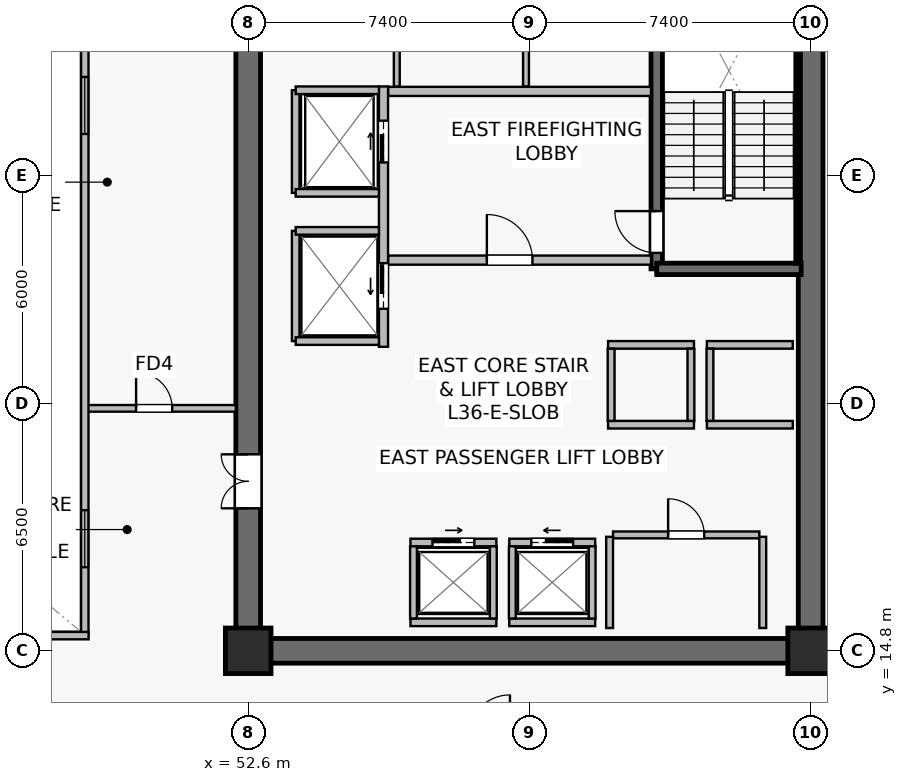
"""IFC4 building model, lengths in metres.
Left out: names, types, materials, properties, quantities, classifications, styles, units other than length and angle.
Written with IfcOpenShell. Run it as: python <this file> out.ifc"""

import sys

from ifc_helpers import new_model, si_unit, direction, frame, frame_2d, origin, origin_2d, place, context, subcontext, project, spatial, rectangle, extrude, source, transform, mapped, element, fill, save


model = new_model("IFC4")
c1 = context("Model", 3, precision=1e-05, world=origin(), true_north=direction((0.0, 1.0)))
c2 = subcontext(c1, "Body", "Model", "MODEL_VIEW")
j1 = project(units=[si_unit("LENGTHUNIT", "METRE"), si_unit("PLANEANGLEUNIT", "RADIAN")], contexts=[c1])
p1 = place(None, origin())
s1 = spatial("IfcSite", under=j1, at=p1, CompositionType="ELEMENT")
p2 = place(p1, origin())
s2 = spatial("IfcBuilding", under=s1, at=p2, CompositionType="ELEMENT")
p3 = place(p2, frame((0.0, 0.0, 150.2)))
s3 = spatial("IfcBuildingStorey", under=s2, at=p3, CompositionType="ELEMENT", Elevation=150.2)
p4 = place(p3, frame((52.275, 14.8, 0.0), z_axis=(0.0, 0.0, 1.0), x_axis=(1.0, 0.0, 0.0)))
e1 = element("IfcWall", 1, at=p4, inside=s3, PredefinedType="SHEAR", context=c2, shape_type="SweptSolid", body=[
    extrude(rectangle(XDim=15.45, YDim=0.65, at=frame_2d((7.725, 0.0))), origin(), (0.0, 0.0, 1.0), 3.79),
])
p5 = place(p3, frame((52.6, 15.125, 0.0), z_axis=(0.0, 0.0, 1.0), x_axis=(0.0, 1.0, 0.0)))
e2 = element("IfcWall", 2, at=p5, inside=s3, PredefinedType="SHEAR", context=c2, shape_type="SweptSolid", body=[
    extrude(rectangle(XDim=18.35, YDim=0.65, at=frame_2d((9.175, 0.0))), origin(), (0.0, 0.0, 1.0), 3.79),
])
p6 = place(p5, frame((3.425, 0.0, 0.0)))
e3 = element("IfcOpeningElement", 3, at=p6, cuts=e2, PredefinedType="OPENING", context=c2, shape_type="SweptSolid", body=[
    extrude(rectangle(XDim=1.42, YDim=2.2, at=frame_2d((0.71, 1.1))), frame((0.0, 0.335, 0.0), z_axis=(0.0, -1.0, 0.0), x_axis=(1.0, 0.0, 0.0)), (0.0, 0.0, 1.0), 0.67),
])
p7 = place(p3, frame((67.4, 15.125, 0.0), z_axis=(0.0, 0.0, 1.0), x_axis=(0.0, 1.0, 0.0)))
e4 = element("IfcWall", 4, at=p7, inside=s3, PredefinedType="SHEAR", context=c2, shape_type="SweptSolid", body=[
    extrude(rectangle(XDim=18.35, YDim=0.65, at=frame_2d((9.175, 0.0))), origin(), (0.0, 0.0, 1.0), 3.79),
])
p8 = place(p3, frame((63.35, 24.85, 0.0), z_axis=(0.0, 0.0, 1.0), x_axis=(0.0, 1.0, 0.0)))
e5 = element("IfcWall", 5, at=p8, inside=s3, PredefinedType="SHEAR", context=c2, shape_type="SweptSolid", body=[
    extrude(rectangle(XDim=8.63, YDim=0.3, at=frame_2d((4.315, 0.0))), origin(), (0.0, 0.0, 1.0), 3.79),
])
p9 = place(p8, frame((0.42, 0.0, 0.0)))
e6 = element("IfcOpeningElement", 6, at=p9, cuts=e5, PredefinedType="OPENING", context=c2, shape_type="SweptSolid", body=[
    extrude(rectangle(XDim=1.1, YDim=2.15, at=frame_2d((0.55, 1.075))), frame((0.0, 0.16, 0.0), z_axis=(0.0, -1.0, 0.0), x_axis=(1.0, 0.0, 0.0)), (0.0, 0.0, 1.0), 0.32),
])
p10 = place(p3, frame((63.35, 24.85, 0.0), z_axis=(0.0, 0.0, 1.0), x_axis=(1.0, 0.0, 0.0)))
e7 = element("IfcWall", 7, at=p10, inside=s3, PredefinedType="SHEAR", context=c2, shape_type="SweptSolid", body=[
    extrude(rectangle(XDim=3.8, YDim=0.3, at=frame_2d((1.9, 0.0))), origin(), (0.0, 0.0, 1.0), 3.79),
])
p11 = place(p3, frame((67.07, 25.0, 0.0), z_axis=(0.0, 0.0, 1.0), x_axis=(0.0, 1.0, 0.0)))
e8 = element("IfcWall", 8, at=p11, inside=s3, PredefinedType="SOLIDWALL", context=c2, shape_type="SweptSolid", body=[
    extrude(rectangle(XDim=8.32, YDim=0.12, at=frame_2d((4.16, 0.0))), origin(), (0.0, 0.0, 1.0), 3.79),
])
m1 = source(origin(), c2, "Body", "SweptSolid", [
    extrude(rectangle(XDim=1.2, YDim=1.2, at=origin_2d()), origin(), (0.0, 0.0, 1.0), 4.1),
])
for number, where, z_axis, x_axis in (
    (9, (52.6, 14.8, 0.0), (0.0, 0.0, 1.0), (1.0, 0.0, 0.0)),
    (10, (67.4, 14.8, 0.0), (0.0, 0.0, 1.0), (1.0, 0.0, 0.0)),
):
    element("IfcColumn", number, at=place(p3, frame(where, z_axis=z_axis, x_axis=x_axis)), inside=s3, PredefinedType="COLUMN", context=c2, shape_type="MappedRepresentation", body=[
        mapped(m1, transform((0.0, 0.0, 0.0), scale=1.0)),
    ])
p12 = place(p3, frame((56.28, 25.08, 0.0), z_axis=(0.0, 0.0, 1.0), x_axis=(1.0, 0.0, 0.0)))
e11 = element("IfcWall", 11, at=p12, inside=s3, PredefinedType="SOLIDWALL", context=c2, shape_type="SweptSolid", body=[
    extrude(rectangle(XDim=6.92, YDim=0.24, at=frame_2d((3.46, 0.0))), origin(), (0.0, 0.0, 1.0), 3.187),
])
p13 = place(p12, frame((2.6, 0.0, 0.0)))
e12 = element("IfcOpeningElement", 12, at=p13, cuts=e11, PredefinedType="OPENING", context=c2, shape_type="SweptSolid", body=[
    extrude(rectangle(XDim=1.2, YDim=2.16, at=frame_2d((0.6, 1.08))), frame((0.0, 0.13, 0.0), z_axis=(0.0, -1.0, 0.0), x_axis=(1.0, 0.0, 0.0)), (0.0, 0.0, 1.0), 0.26),
])
p14 = place(p3, frame((56.28, 29.52, 0.0), z_axis=(0.0, 0.0, 1.0), x_axis=(1.0, 0.0, 0.0)))
e13 = element("IfcWall", 13, at=p14, inside=s3, PredefinedType="SOLIDWALL", context=c2, shape_type="SweptSolid", body=[
    extrude(rectangle(XDim=6.92, YDim=0.24, at=frame_2d((3.46, 0.0))), origin(), (0.0, 0.0, 1.0), 3.187),
])
p15 = place(p3, frame((56.16, 22.8, 0.0), z_axis=(0.0, 0.0, 1.0), x_axis=(0.0, 1.0, 0.0)))
e14 = element("IfcWall", 14, at=p15, inside=s3, PredefinedType="SOLIDWALL", context=c2, shape_type="SweptSolid", body=[
    extrude(rectangle(XDim=6.85, YDim=0.24, at=frame_2d((3.425, 0.0))), origin(), (0.0, 0.0, 1.0), 2.875),
])
p16 = place(p15, frame((4.85, 0.0, 0.0)))
e15 = element("IfcOpeningElement", 15, at=p16, cuts=e14, PredefinedType="OPENING", context=c2, shape_type="SweptSolid", body=[
    extrude(rectangle(XDim=1.1, YDim=2.22, at=frame_2d((0.55, 1.11))), frame((0.0, 0.13, 0.0), z_axis=(0.0, -1.0, 0.0), x_axis=(1.0, 0.0, 0.0)), (0.0, 0.0, 1.0), 0.26),
])
p17 = place(p15, frame((1.0, 0.0, 0.0)))
e16 = element("IfcOpeningElement", 16, at=p17, cuts=e14, PredefinedType="OPENING", context=c2, shape_type="SweptSolid", body=[
    extrude(rectangle(XDim=1.2, YDim=2.22, at=frame_2d((0.6, 1.11))), frame((0.0, 0.13, 0.0), z_axis=(0.0, -1.0, 0.0), x_axis=(1.0, 0.0, 0.0)), (0.0, 0.0, 1.0), 0.26),
])
p18 = place(p3, frame((59.47, 17.65, 0.0), z_axis=(0.0, 0.0, 1.0), x_axis=(1.0, 0.0, 0.0)))
e17 = element("IfcWall", 17, at=p18, inside=s3, PredefinedType="SOLIDWALL", context=c2, shape_type="SweptSolid", body=[
    extrude(rectangle(XDim=2.26, YDim=0.2, at=frame_2d((1.13, 0.0))), origin(), (0.0, 0.0, 1.0), 3.187),
])
p19 = place(p18, frame((0.58, 0.0, 0.0)))
e18 = element("IfcOpeningElement", 18, at=p19, cuts=e17, PredefinedType="OPENING", context=c2, shape_type="SweptSolid", body=[
    extrude(rectangle(XDim=1.1, YDim=2.22, at=frame_2d((0.55, 1.11))), frame((0.0, 0.11, 0.0), z_axis=(0.0, -1.0, 0.0), x_axis=(1.0, 0.0, 0.0)), (0.0, 0.0, 1.0), 0.22),
])
p20 = place(p3, frame((59.47, 15.55, 0.0), z_axis=(0.0, 0.0, 1.0), x_axis=(1.0, 0.0, 0.0)))
e19 = element("IfcWall", 19, at=p20, inside=s3, PredefinedType="SOLIDWALL", context=c2, shape_type="SweptSolid", body=[
    extrude(rectangle(XDim=2.26, YDim=0.2, at=frame_2d((1.13, 0.0))), origin(), (0.0, 0.0, 1.0), 3.187),
])
for number, where, z_axis, x_axis in (
    (20, (59.55, 15.65, 0.0), (0.0, 0.0, 1.0), (0.0, 1.0, 0.0)),
    (21, (61.65, 15.65, 0.0), (0.0, 0.0, 1.0), (0.0, 1.0, 0.0)),
):
    element("IfcWall", number, at=place(p3, frame(where, z_axis=z_axis, x_axis=x_axis)), inside=s3, PredefinedType="SOLIDWALL", context=c2, shape_type="SweptSolid", body=[
        extrude(rectangle(XDim=1.9, YDim=0.18, at=frame_2d((0.95, 0.0))), origin(), (0.0, 0.0, 1.0), 3.79),
    ])
p21 = place(p3, frame((56.87, 17.65, 0.0), z_axis=(0.0, 0.0, 1.0), x_axis=(1.0, 0.0, 0.0)))
e22 = element("IfcWall", 22, at=p21, inside=s3, PredefinedType="SOLIDWALL", context=c2, shape_type="SweptSolid", body=[
    extrude(rectangle(XDim=2.26, YDim=0.2, at=frame_2d((1.13, 0.0))), origin(), (0.0, 0.0, 1.0), 3.79),
])
p22 = place(p21, frame((0.58, 0.0, 0.0)))
e23 = element("IfcOpeningElement", 23, at=p22, cuts=e22, PredefinedType="OPENING", context=c2, shape_type="SweptSolid", body=[
    extrude(rectangle(XDim=1.1, YDim=2.22, at=frame_2d((0.55, 1.11))), frame((0.0, 0.11, 0.0), z_axis=(0.0, -1.0, 0.0), x_axis=(1.0, 0.0, 0.0)), (0.0, 0.0, 1.0), 0.22),
])
p23 = place(p3, frame((56.87, 15.55, 0.0), z_axis=(0.0, 0.0, 1.0), x_axis=(1.0, 0.0, 0.0)))
e24 = element("IfcWall", 24, at=p23, inside=s3, PredefinedType="SOLIDWALL", context=c2, shape_type="SweptSolid", body=[
    extrude(rectangle(XDim=2.26, YDim=0.2, at=frame_2d((1.13, 0.0))), origin(), (0.0, 0.0, 1.0), 3.79),
])
for number, where, z_axis, x_axis in (
    (25, (56.95, 15.65, 0.0), (0.0, 0.0, 1.0), (0.0, 1.0, 0.0)),
    (26, (59.05, 15.65, 0.0), (0.0, 0.0, 1.0), (0.0, 1.0, 0.0)),
):
    element("IfcWall", number, at=place(p3, frame(where, z_axis=z_axis, x_axis=x_axis)), inside=s3, PredefinedType="SOLIDWALL", context=c2, shape_type="SweptSolid", body=[
        extrude(rectangle(XDim=1.9, YDim=0.18, at=frame_2d((0.95, 0.0))), origin(), (0.0, 0.0, 1.0), 3.79),
    ])
for number, where, z_axis, x_axis in (
    (27, (64.67, 20.75, 0.0), (0.0, 0.0, 1.0), (1.0, 0.0, 0.0)),
    (28, (64.67, 22.85, 0.0), (0.0, 0.0, 1.0), (1.0, 0.0, 0.0)),
):
    element("IfcWall", number, at=place(p3, frame(where, z_axis=z_axis, x_axis=x_axis)), inside=s3, PredefinedType="SOLIDWALL", context=c2, shape_type="SweptSolid", body=[
        extrude(rectangle(XDim=2.26, YDim=0.2, at=frame_2d((1.13, 0.0))), origin(), (0.0, 0.0, 1.0), 3.79),
    ])
p24 = place(p3, frame((64.75, 20.85, 0.0), z_axis=(0.0, 0.0, 1.0), x_axis=(0.0, 1.0, 0.0)))
e29 = element("IfcWall", 29, at=p24, inside=s3, PredefinedType="SOLIDWALL", context=c2, shape_type="SweptSolid", body=[
    extrude(rectangle(XDim=1.9, YDim=0.18, at=frame_2d((0.95, 0.0))), origin(), (0.0, 0.0, 1.0), 3.79),
])
for number, where, z_axis, x_axis in (
    (30, (62.07, 20.75, 0.0), (0.0, 0.0, 1.0), (1.0, 0.0, 0.0)),
    (31, (62.07, 22.85, 0.0), (0.0, 0.0, 1.0), (1.0, 0.0, 0.0)),
):
    element("IfcWall", number, at=place(p3, frame(where, z_axis=z_axis, x_axis=x_axis)), inside=s3, PredefinedType="SOLIDWALL", context=c2, shape_type="SweptSolid", body=[
        extrude(rectangle(XDim=2.26, YDim=0.2, at=frame_2d((1.13, 0.0))), origin(), (0.0, 0.0, 1.0), 3.79),
    ])
for number, where, z_axis, x_axis in (
    (32, (62.15, 20.85, 0.0), (0.0, 0.0, 1.0), (0.0, 1.0, 0.0)),
    (33, (64.25, 20.85, 0.0), (0.0, 0.0, 1.0), (0.0, 1.0, 0.0)),
):
    element("IfcWall", number, at=place(p3, frame(where, z_axis=z_axis, x_axis=x_axis)), inside=s3, PredefinedType="SOLIDWALL", context=c2, shape_type="SweptSolid", body=[
        extrude(rectangle(XDim=1.9, YDim=0.18, at=frame_2d((0.95, 0.0))), origin(), (0.0, 0.0, 1.0), 3.79),
    ])
p25 = place(p3, frame((53.85, 26.85, 0.0), z_axis=(0.0, 0.0, 1.0), x_axis=(0.0, 1.0, 0.0)))
e34 = element("IfcWall", 34, at=p25, inside=s3, PredefinedType="SOLIDWALL", context=c2, shape_type="SweptSolid", body=[
    extrude(rectangle(XDim=2.7, YDim=0.2, at=frame_2d((1.35, 0.0))), origin(), (0.0, 0.0, 1.0), 3.79),
])
p26 = place(p3, frame((53.85, 29.55, 0.0), z_axis=(0.0, 0.0, 1.0), x_axis=(1.0, 0.0, 0.0)))
e35 = element("IfcWall", 35, at=p26, inside=s3, PredefinedType="SOLIDWALL", context=c2, shape_type="SweptSolid", body=[
    extrude(rectangle(XDim=2.19, YDim=0.2, at=frame_2d((1.095, 0.0))), origin(), (0.0, 0.0, 1.0), 3.79),
])
p27 = place(p3, frame((53.85, 26.85, 0.0), z_axis=(0.0, 0.0, 1.0), x_axis=(1.0, 0.0, 0.0)))
e36 = element("IfcWall", 36, at=p27, inside=s3, PredefinedType="SOLIDWALL", context=c2, shape_type="SweptSolid", body=[
    extrude(rectangle(XDim=2.19, YDim=0.2, at=frame_2d((1.095, 0.0))), origin(), (0.0, 0.0, 1.0), 3.187),
])
p28 = place(p3, frame((53.85, 22.95, 0.0), z_axis=(0.0, 0.0, 1.0), x_axis=(0.0, 1.0, 0.0)))
e37 = element("IfcWall", 37, at=p28, inside=s3, PredefinedType="SOLIDWALL", context=c2, shape_type="SweptSolid", body=[
    extrude(rectangle(XDim=2.9, YDim=0.2, at=frame_2d((1.45, 0.0))), origin(), (0.0, 0.0, 1.0), 2.875),
])
for number, where, z_axis, x_axis in (
    (38, (53.85, 25.85, 0.0), (0.0, 0.0, 1.0), (1.0, 0.0, 0.0)),
    (39, (53.85, 22.95, 0.0), (0.0, 0.0, 1.0), (1.0, 0.0, 0.0)),
):
    element("IfcWall", number, at=place(p3, frame(where, z_axis=z_axis, x_axis=x_axis)), inside=s3, PredefinedType="SOLIDWALL", context=c2, shape_type="SweptSolid", body=[
        extrude(rectangle(XDim=2.19, YDim=0.2, at=frame_2d((1.095, 0.0))), origin(), (0.0, 0.0, 1.0), 3.79),
    ])
p29 = place(p3, frame((62.2, 17.85, 0.0), z_axis=(0.0, 0.0, 1.0), x_axis=(1.0, 0.0, 0.0)))
e40 = element("IfcWall", 40, at=p29, inside=s3, PredefinedType="SOLIDWALL", context=c2, shape_type="SweptSolid", body=[
    extrude(rectangle(XDim=3.85, YDim=0.18, at=frame_2d((1.925, 0.0))), origin(), (0.0, 0.0, 1.0), 3.79),
])
p30 = place(p29, frame((1.45, 0.0, 0.0)))
e41 = element("IfcOpeningElement", 41, at=p30, cuts=e40, PredefinedType="OPENING", context=c2, shape_type="SweptSolid", body=[
    extrude(rectangle(XDim=0.95, YDim=2.15, at=frame_2d((0.475, 1.075))), frame((0.0, 0.1, 0.0), z_axis=(0.0, -1.0, 0.0), x_axis=(1.0, 0.0, 0.0)), (0.0, 0.0, 1.0), 0.2),
])
for number, where, z_axis, x_axis in (
    (42, (62.11, 15.4, 0.0), (0.0, 0.0, 1.0), (0.0, 1.0, 0.0)),
    (43, (66.14, 15.4, 0.0), (0.0, 0.0, 1.0), (0.0, 1.0, 0.0)),
):
    element("IfcWall", number, at=place(p3, frame(where, z_axis=z_axis, x_axis=x_axis)), inside=s3, PredefinedType="SOLIDWALL", context=c2, shape_type="SweptSolid", body=[
        extrude(rectangle(XDim=2.4, YDim=0.18, at=frame_2d((1.2, 0.0))), origin(), (0.0, 0.0, 1.0), 3.79),
    ])
p31 = place(p3, frame((59.91, 29.65, 0.0), z_axis=(0.0, 0.0, 1.0), x_axis=(0.0, 1.0, 0.0)))
e44 = element("IfcWall", 44, at=p31, inside=s3, PredefinedType="PLUMBINGWALL", context=c2, shape_type="SweptSolid", body=[
    extrude(rectangle(XDim=3.93, YDim=0.155, at=frame_2d((1.965, 0.0))), origin(), (0.0, 0.0, 1.0), 3.187),
])
p32 = place(p3, frame((56.51, 29.65, 0.0), z_axis=(0.0, 0.0, 1.0), x_axis=(0.0, 1.0, 0.0)))
e45 = element("IfcWall", 45, at=p32, inside=s3, PredefinedType="PLUMBINGWALL", context=c2, shape_type="SweptSolid", body=[
    extrude(rectangle(XDim=3.93, YDim=0.155, at=frame_2d((1.965, 0.0))), origin(), (0.0, 0.0, 1.0), 3.79),
])
p33 = place(p3, frame((48.3, 21.18, 0.0), z_axis=(0.0, 0.0, 1.0), x_axis=(1.0, 0.0, 0.0)))
e46 = element("IfcWall", 46, at=p33, inside=s3, PredefinedType="PARTITIONING", context=c2, shape_type="SweptSolid", body=[
    extrude(rectangle(XDim=3.975, YDim=0.175, at=frame_2d((1.987, 0.0))), origin(), (0.0, 0.0, 1.0), 3.79),
])
p34 = place(p33, frame((1.35, 0.0, 0.0)))
e47 = element("IfcOpeningElement", 47, at=p34, cuts=e46, PredefinedType="OPENING", context=c2, shape_type="SweptSolid", body=[
    extrude(rectangle(XDim=0.95, YDim=2.15, at=frame_2d((0.475, 1.075))), frame((0.0, 0.098, 0.0), z_axis=(0.0, -1.0, 0.0), x_axis=(1.0, 0.0, 0.0)), (0.0, 0.0, 1.0), 0.195),
])
p35 = place(p3, frame((48.3, 15.2, 0.0), z_axis=(0.0, 0.0, 1.0), x_axis=(0.0, 1.0, 0.0)))
e48 = element("IfcWall", 48, at=p35, inside=s3, PredefinedType="SOLIDWALL", context=c2, shape_type="SweptSolid", body=[
    extrude(rectangle(XDim=18.2, YDim=0.195, at=frame_2d((9.1, 0.0))), origin(), (0.0, 0.0, 1.0), 3.79),
])
p36 = place(p35, frame((1.8, 0.0, 0.9)))
e49 = element("IfcOpeningElement", 49, at=p36, cuts=e48, PredefinedType="OPENING", context=c2, shape_type="SweptSolid", body=[
    extrude(rectangle(XDim=1.5, YDim=1.4, at=frame_2d((0.75, 0.7))), frame((0.0, 0.107, 0.0), z_axis=(0.0, -1.0, 0.0), x_axis=(1.0, 0.0, 0.0)), (0.0, 0.0, 1.0), 0.215),
])
p37 = place(p35, frame((13.2, 0.0, 0.9)))
e50 = element("IfcOpeningElement", 50, at=p37, cuts=e48, PredefinedType="OPENING", context=c2, shape_type="SweptSolid", body=[
    extrude(rectangle(XDim=1.5, YDim=1.4, at=frame_2d((0.75, 0.7))), frame((0.0, 0.107, 0.0), z_axis=(0.0, -1.0, 0.0), x_axis=(1.0, 0.0, 0.0)), (0.0, 0.0, 1.0), 0.215),
])
p38 = place(p3, frame((26.4, 15.2, 0.0), z_axis=(0.0, 0.0, 1.0), x_axis=(1.0, 0.0, 0.0)))
e51 = element("IfcWall", 51, at=p38, inside=s3, PredefinedType="SOLIDWALL", context=c2, shape_type="SweptSolid", body=[
    extrude(rectangle(XDim=22.0, YDim=0.195, at=frame_2d((11.0, 0.0))), origin(), (0.0, 0.0, 1.0), 3.79),
])
m2 = source(origin(), c2, "Body", "SweptSolid", [
    extrude(rectangle(XDim=1.5, YDim=1.4, at=frame_2d((0.75, 0.7))), frame((0.0, 0.03, 0.0), z_axis=(0.0, -1.0, 0.0), x_axis=(1.0, 0.0, 0.0)), (0.0, 0.0, 1.0), 0.06),
])
p39 = place(p36, origin())
e52 = element("IfcWindow", 52, at=p39, inside=s3, PartitioningType="SINGLE_PANEL", PredefinedType="WINDOW", context=c2, shape_type="MappedRepresentation", body=[
    mapped(m2, transform((0.0, 0.0, 0.0), scale=1.0)),
])
fill(e49, e52)
p40 = place(p37, origin())
e53 = element("IfcWindow", 53, at=p40, inside=s3, PartitioningType="SINGLE_PANEL", PredefinedType="WINDOW", context=c2, shape_type="MappedRepresentation", body=[
    mapped(m2, transform((0.0, 0.0, 0.0), scale=1.0)),
])
fill(e50, e53)
m3 = source(origin(), c2, "Body", "SweptSolid", [
    extrude(rectangle(XDim=1.1, YDim=2.15, at=frame_2d((0.55, 1.075))), frame((0.0, 0.025, 0.0), z_axis=(0.0, -1.0, 0.0), x_axis=(1.0, 0.0, 0.0)), (0.0, 0.0, 1.0), 0.05),
])
p41 = place(p9, origin())
e54 = element("IfcDoor", 54, at=p41, inside=s3, OperationType="SINGLE_SWING_RIGHT", PredefinedType="DOOR", context=c2, shape_type="MappedRepresentation", body=[
    mapped(m3, transform((0.0, 0.0, 0.0), scale=1.0)),
])
fill(e6, e54)
m4 = source(origin(), c2, "Body", "SweptSolid", [
    extrude(rectangle(XDim=1.2, YDim=2.16, at=frame_2d((0.6, 1.08))), frame((0.0, 0.025, 0.0), z_axis=(0.0, -1.0, 0.0), x_axis=(1.0, 0.0, 0.0)), (0.0, 0.0, 1.0), 0.05),
])
p42 = place(p13, origin())
e55 = element("IfcDoor", 55, at=p42, inside=s3, OperationType="SINGLE_SWING_LEFT", PredefinedType="DOOR", context=c2, shape_type="MappedRepresentation", body=[
    mapped(m4, transform((0.0, 0.0, 0.0), scale=1.0)),
])
fill(e12, e55)
m5 = source(origin(), c2, "Body", "SweptSolid", [
    extrude(rectangle(XDim=1.1, YDim=2.22, at=frame_2d((0.55, 1.11))), frame((0.0, 0.025, 0.0), z_axis=(0.0, -1.0, 0.0), x_axis=(1.0, 0.0, 0.0)), (0.0, 0.0, 1.0), 0.05),
])
p43 = place(p19, origin())
e56 = element("IfcDoor", 56, at=p43, inside=s3, OperationType="SLIDING_TO_LEFT", PredefinedType="USERDEFINED", context=c2, shape_type="MappedRepresentation", body=[
    mapped(m5, transform((0.0, 0.0, 0.0), scale=1.0)),
])
fill(e18, e56)
p44 = place(p22, origin())
e57 = element("IfcDoor", 57, at=p44, inside=s3, OperationType="SLIDING_TO_RIGHT", PredefinedType="USERDEFINED", context=c2, shape_type="MappedRepresentation", body=[
    mapped(m5, transform((0.0, 0.0, 0.0), scale=1.0)),
])
fill(e23, e57)
p45 = place(p16, origin())
e58 = element("IfcDoor", 58, at=p45, inside=s3, OperationType="SLIDING_TO_RIGHT", PredefinedType="USERDEFINED", context=c2, shape_type="MappedRepresentation", body=[
    mapped(m5, transform((0.0, 0.0, 0.0), scale=1.0)),
])
fill(e15, e58)
m6 = source(origin(), c2, "Body", "SweptSolid", [
    extrude(rectangle(XDim=1.2, YDim=2.22, at=frame_2d((0.6, 1.11))), frame((0.0, 0.025, 0.0), z_axis=(0.0, -1.0, 0.0), x_axis=(1.0, 0.0, 0.0)), (0.0, 0.0, 1.0), 0.05),
])
p46 = place(p17, origin())
e59 = element("IfcDoor", 59, at=p46, inside=s3, OperationType="SLIDING_TO_LEFT", PredefinedType="USERDEFINED", context=c2, shape_type="MappedRepresentation", body=[
    mapped(m6, transform((0.0, 0.0, 0.0), scale=1.0)),
])
fill(e16, e59)
m7 = source(origin(), c2, "Body", "SweptSolid", [
    extrude(rectangle(XDim=0.95, YDim=2.15, at=frame_2d((0.475, 1.075))), frame((0.0, 0.025, 0.0), z_axis=(0.0, -1.0, 0.0), x_axis=(1.0, 0.0, 0.0)), (0.0, 0.0, 1.0), 0.05),
])
p47 = place(p30, origin())
e60 = element("IfcDoor", 60, at=p47, inside=s3, OperationType="SINGLE_SWING_LEFT", PredefinedType="DOOR", context=c2, shape_type="MappedRepresentation", body=[
    mapped(m7, transform((0.0, 0.0, 0.0), scale=1.0)),
])
fill(e41, e60)
m8 = source(origin(), c2, "Body", "SweptSolid", [
    extrude(rectangle(XDim=1.42, YDim=2.2, at=frame_2d((0.71, 1.1))), frame((0.0, 0.025, 0.0), z_axis=(0.0, -1.0, 0.0), x_axis=(1.0, 0.0, 0.0)), (0.0, 0.0, 1.0), 0.05),
])
p48 = place(p6, origin())
e61 = element("IfcDoor", 61, at=p48, inside=s3, OperationType="DOUBLE_DOOR_SINGLE_SWING", PredefinedType="DOOR", context=c2, shape_type="MappedRepresentation", body=[
    mapped(m8, transform((0.0, 0.0, 0.0), scale=1.0)),
])
fill(e3, e61)
p49 = place(p34, origin())
e62 = element("IfcDoor", 62, at=p49, inside=s3, OperationType="SINGLE_SWING_LEFT", PredefinedType="DOOR", context=c2, shape_type="MappedRepresentation", body=[
    mapped(m7, transform((0.0, 0.0, 0.0), scale=1.0)),
])
fill(e47, e62)
save(model, sys.argv[1])
